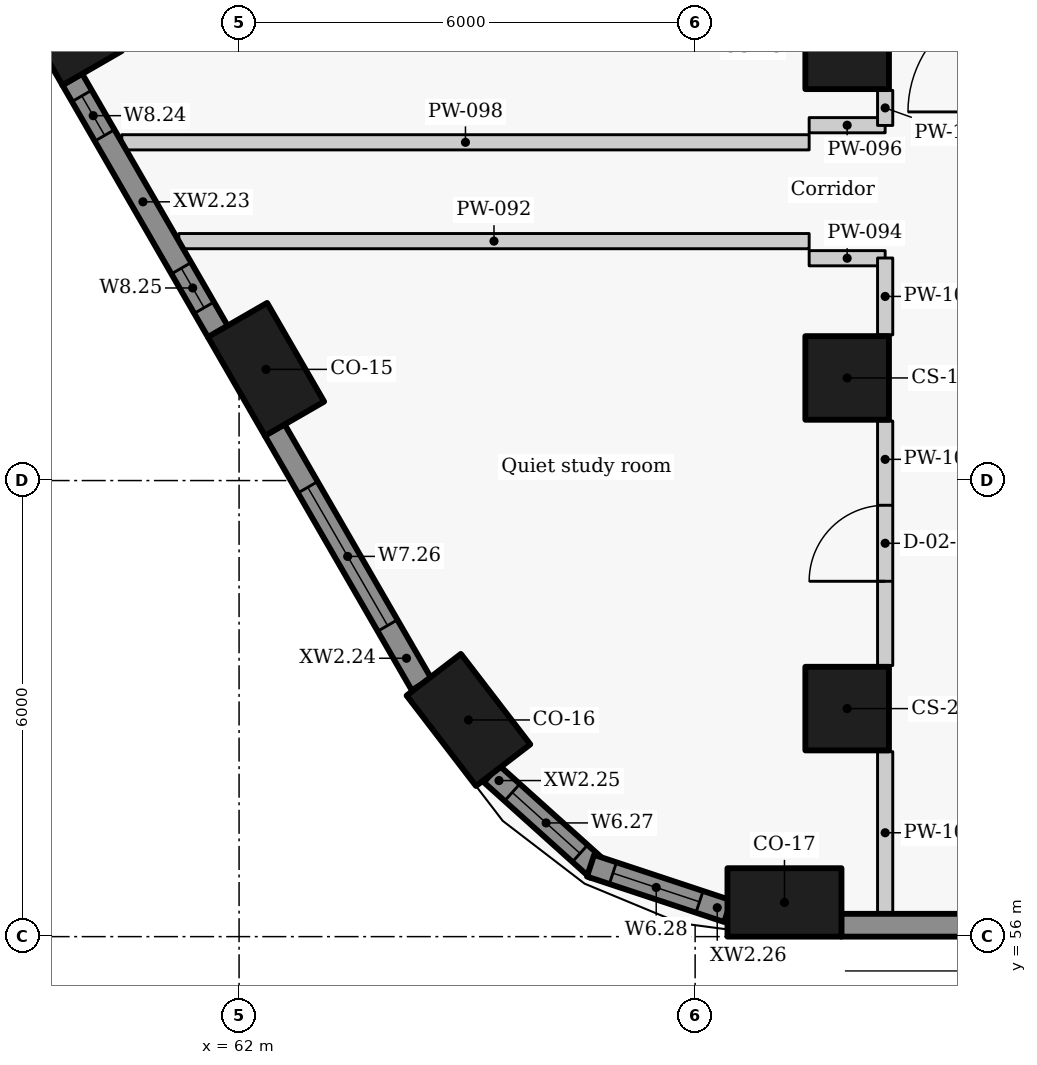
"""IFC4 building model, lengths in metres.
Left out: names, types, materials, properties, quantities, classifications, styles, units other than length and angle.
Written with IfcOpenShell. Run it as: python <this file> out.ifc"""

import sys

from ifc_helpers import new_model, si_unit, direction, frame, frame_2d, origin, origin_2d, place, context, subcontext, project, spatial, rectangle, extrude, element, fill, save


model = new_model("IFC4")
c1 = context("Model", 3, precision=1e-05, world=origin(), true_north=direction((0.0, 1.0)))
c2 = subcontext(c1, "Body", "Model", "MODEL_VIEW")
j1 = project(units=[si_unit("LENGTHUNIT", "METRE"), si_unit("PLANEANGLEUNIT", "RADIAN")], contexts=[c1])
p1 = place(None, origin())
s1 = spatial("IfcSite", under=j1, at=p1, CompositionType="ELEMENT")
p2 = place(p1, origin())
s2 = spatial("IfcBuilding", under=s1, at=p2, CompositionType="ELEMENT")
p3 = place(p2, frame((0.0, 0.0, 67.8)))
s3 = spatial("IfcBuildingStorey", under=s2, at=p3, CompositionType="ELEMENT", Elevation=67.8)
for number, where, z_axis, x_axis in (
    (1, (59.692, 68.075, 0.0), (0.0, 0.0, 1.0), (0.5, -0.866, 0.0)),
    (2, (62.354, 63.463, 0.0), (0.0, 0.0, 1.0), (0.5, -0.866, 0.0)),
    (3, (65.018, 58.851, 0.0), (0.0, 0.0, 1.0), (0.609, -0.793, 0.0)),
    (4, (69.175, 56.45, 0.0), (0.0, 0.0, 1.0), (1.0, 0.0, 0.0)),
):
    element("IfcColumn", number, at=place(p3, frame(where, z_axis=z_axis, x_axis=x_axis)), inside=s3, PredefinedType="COLUMN", context=c2, shape_type="SweptSolid", body=[
        extrude(rectangle(XDim=1.5, YDim=0.9, at=origin_2d()), origin(), (0.0, 0.0, 1.0), 3.3),
    ])
for number, where, z_axis, x_axis in (
    (5, (70.0, 67.7, 0.0), (0.0, 0.0, 1.0), (0.0, -1.0, 0.0)),
    (6, (70.0, 63.35, 0.0), (0.0, 0.0, 1.0), (0.0, -1.0, 0.0)),
    (7, (70.0, 59.0, 0.0), (0.0, 0.0, 1.0), (0.0, -1.0, 0.0)),
):
    element("IfcColumn", number, at=place(p3, frame(where, z_axis=z_axis, x_axis=x_axis)), inside=s3, PredefinedType="COLUMN", context=c2, shape_type="SweptSolid", body=[
        extrude(rectangle(XDim=1.1, YDim=1.1, at=origin_2d()), origin(), (0.0, 0.0, 1.0), 3.3),
    ])
p4 = place(p3, frame((59.805, 67.279, 0.0), z_axis=(0.0, 0.0, 1.0), x_axis=(0.500001735503, -0.866024401789, 0.0)))
e8 = element("IfcWall", 8, at=p4, inside=s3, PredefinedType="SOLIDWALL", context=c2, shape_type="SweptSolid", body=[
    extrude(rectangle(XDim=3.834, YDim=0.3, at=frame_2d((1.917, 0.0))), origin(), (0.0, 0.0, 1.0), 2.05),
])
p5 = place(p4, frame((0.253, 0.0, 0.9)))
e9 = element("IfcOpeningElement", 9, at=p5, cuts=e8, PredefinedType="OPENING", context=c2, shape_type="SweptSolid", body=[
    extrude(rectangle(XDim=0.6, YDim=1.1, at=frame_2d((0.3, 0.55))), frame((0.0, 0.16, 0.0), z_axis=(0.0, -1.0, 0.0), x_axis=(1.0, 0.0, 0.0)), (0.0, 0.0, 1.0), 0.32),
])
p6 = place(p4, frame((2.87, 0.0, 0.9)))
e10 = element("IfcOpeningElement", 10, at=p6, cuts=e8, PredefinedType="OPENING", context=c2, shape_type="SweptSolid", body=[
    extrude(rectangle(XDim=0.6, YDim=1.1, at=frame_2d((0.3, 0.55))), frame((0.0, 0.16, 0.0), z_axis=(0.0, -1.0, 0.0), x_axis=(1.0, 0.0, 0.0)), (0.0, 0.0, 1.0), 0.32),
])
p7 = place(p3, frame((62.468, 62.667, 0.0), z_axis=(0.0, 0.0, 1.0), x_axis=(0.499948341072, -0.866055227026, 0.0)))
e11 = element("IfcWall", 11, at=p7, inside=s3, PredefinedType="SOLIDWALL", context=c2, shape_type="SweptSolid", body=[
    extrude(rectangle(XDim=3.867, YDim=0.3, at=frame_2d((1.934, 0.0))), origin(), (0.0, 0.0, 1.0), 2.05),
])
p8 = place(p7, frame((0.872, 0.0, 0.9)))
e12 = element("IfcOpeningElement", 12, at=p8, cuts=e11, PredefinedType="OPENING", context=c2, shape_type="SweptSolid", body=[
    extrude(rectangle(XDim=2.1, YDim=1.1, at=frame_2d((1.05, 0.55))), frame((0.0, 0.16, 0.0), z_axis=(0.0, -1.0, 0.0), x_axis=(1.0, 0.0, 0.0)), (0.0, 0.0, 1.0), 0.32),
])
p9 = place(p3, frame((65.32, 58.143, 0.0), z_axis=(0.0, 0.0, 1.0), x_axis=(0.7435526378, -0.668677407141, 0.0)))
e13 = element("IfcWall", 13, at=p9, inside=s3, PredefinedType="SOLIDWALL", context=c2, shape_type="SweptSolid", body=[
    extrude(rectangle(XDim=1.878, YDim=0.3, at=frame_2d((0.939, 0.0))), origin(), (0.0, 0.0, 1.0), 2.05),
])
p10 = place(p9, frame((0.367, 0.0, 0.9)))
e14 = element("IfcOpeningElement", 14, at=p10, cuts=e13, PredefinedType="OPENING", context=c2, shape_type="SweptSolid", body=[
    extrude(rectangle(XDim=1.2, YDim=1.1, at=frame_2d((0.6, 0.55))), frame((0.0, 0.16, 0.0), z_axis=(0.0, -1.0, 0.0), x_axis=(1.0, 0.0, 0.0)), (0.0, 0.0, 1.0), 0.32),
])
p11 = place(p3, frame((66.624, 56.933, 0.0), z_axis=(0.0, 0.0, 1.0), x_axis=(0.949246659442, -0.314532636683, 0.0)))
e15 = element("IfcWall", 15, at=p11, inside=s3, PredefinedType="SOLIDWALL", context=c2, shape_type="SweptSolid", body=[
    extrude(rectangle(XDim=1.902, YDim=0.3, at=frame_2d((0.951, 0.0))), origin(), (0.0, 0.0, 1.0), 2.05),
])
p12 = place(p11, frame((0.31, 0.0, 0.9)))
e16 = element("IfcOpeningElement", 16, at=p12, cuts=e15, PredefinedType="OPENING", context=c2, shape_type="SweptSolid", body=[
    extrude(rectangle(XDim=1.2, YDim=1.1, at=frame_2d((0.6, 0.55))), frame((0.0, 0.16, 0.0), z_axis=(0.0, -1.0, 0.0), x_axis=(1.0, 0.0, 0.0)), (0.0, 0.0, 1.0), 0.32),
])
p13 = place(p3, frame((69.921, 56.15, 0.0), z_axis=(0.0, 0.0, 1.0), x_axis=(1.0, 0.0, 0.0)))
e17 = element("IfcWall", 17, at=p13, inside=s3, PredefinedType="SOLIDWALL", context=c2, shape_type="SweptSolid", body=[
    extrude(rectangle(XDim=19.84, YDim=0.3, at=frame_2d((9.92, 0.0))), origin(), (0.0, 0.0, 1.0), 2.05),
])
p14 = place(p3, frame((61.207, 65.15, 0.0), z_axis=(0.0, 0.0, 1.0), x_axis=(1.0, 0.0, 0.0)))
e18 = element("IfcWall", 18, at=p14, inside=s3, PredefinedType="PARTITIONING", context=c2, shape_type="SweptSolid", body=[
    extrude(rectangle(XDim=8.293, YDim=0.2, at=frame_2d((4.146, 0.0))), origin(), (0.0, 0.0, 1.0), 2.03),
])
for number, where, z_axis, x_axis in (
    (19, (69.5, 64.925, 0.0), (0.0, 0.0, 1.0), (1.0, 0.0, 0.0)),
    (20, (69.5, 66.675, 0.0), (0.0, 0.0, 1.0), (1.0, 0.0, 0.0)),
):
    element("IfcWall", number, at=place(p3, frame(where, z_axis=z_axis, x_axis=x_axis)), inside=s3, PredefinedType="PARTITIONING", context=c2, shape_type="SweptSolid", body=[
        extrude(rectangle(XDim=1.0, YDim=0.2, at=frame_2d((0.5, 0.0))), origin(), (0.0, 0.0, 1.0), 2.43),
    ])
p15 = place(p3, frame((60.457, 66.45, 0.0), z_axis=(0.0, 0.0, 1.0), x_axis=(1.0, 0.0, 0.0)))
e21 = element("IfcWall", 21, at=p15, inside=s3, PredefinedType="PARTITIONING", context=c2, shape_type="SweptSolid", body=[
    extrude(rectangle(XDim=9.043, YDim=0.2, at=frame_2d((4.521, 0.0))), origin(), (0.0, 0.0, 1.0), 2.03),
])
p16 = place(p3, frame((70.5, 56.3, 0.0), z_axis=(0.0, 0.0, 1.0), x_axis=(0.0, 1.0, 0.0)))
e22 = element("IfcWall", 22, at=p16, inside=s3, PredefinedType="PARTITIONING", context=c2, shape_type="SweptSolid", body=[
    extrude(rectangle(XDim=2.133, YDim=0.2, at=frame_2d((1.066, 0.0))), origin(), (0.0, 0.0, 1.0), 2.95),
])
p17 = place(p3, frame((70.5, 59.567, 0.0), z_axis=(0.0, 0.0, 1.0), x_axis=(0.0, 1.0, 0.0)))
e23 = element("IfcWall", 23, at=p17, inside=s3, PredefinedType="PARTITIONING", context=c2, shape_type="SweptSolid", body=[
    extrude(rectangle(XDim=3.216, YDim=0.2, at=frame_2d((1.608, 0.0))), origin(), (0.0, 0.0, 1.0), 2.95),
])
p18 = place(p17, frame((1.108, 0.0, 0.0)))
e24 = element("IfcOpeningElement", 24, at=p18, cuts=e23, PredefinedType="OPENING", context=c2, shape_type="SweptSolid", body=[
    extrude(rectangle(XDim=1.0, YDim=2.1, at=frame_2d((0.5, 1.05))), frame((0.0, 0.11, 0.0), z_axis=(0.0, -1.0, 0.0), x_axis=(1.0, 0.0, 0.0)), (0.0, 0.0, 1.0), 0.22),
])
p19 = place(p3, frame((70.5, 63.917, 0.0), z_axis=(0.0, 0.0, 1.0), x_axis=(0.0, 1.0, 0.0)))
e25 = element("IfcWall", 25, at=p19, inside=s3, PredefinedType="PARTITIONING", context=c2, shape_type="SweptSolid", body=[
    extrude(rectangle(XDim=1.011, YDim=0.2, at=frame_2d((0.505, 0.0))), origin(), (0.0, 0.0, 1.0), 2.95),
])
p20 = place(p3, frame((70.5, 66.672, 0.0), z_axis=(0.0, 0.0, 1.0), x_axis=(0.0, 1.0, 0.0)))
e26 = element("IfcWall", 26, at=p20, inside=s3, PredefinedType="PARTITIONING", context=c2, shape_type="SweptSolid", body=[
    extrude(rectangle(XDim=0.461, YDim=0.2, at=frame_2d((0.23, 0.0))), origin(), (0.0, 0.0, 1.0), 2.95),
])
p21 = place(p5, origin())
e27 = element("IfcWindow", 27, at=p21, inside=s3, PartitioningType="SINGLE_PANEL", PredefinedType="WINDOW", context=c2, shape_type="SweptSolid", body=[
    extrude(rectangle(XDim=0.6, YDim=1.1, at=frame_2d((0.3, 0.55))), frame((0.0, 0.03, 0.0), z_axis=(0.0, -1.0, 0.0), x_axis=(1.0, 0.0, 0.0)), (0.0, 0.0, 1.0), 0.06),
])
fill(e9, e27)
p22 = place(p6, origin())
e28 = element("IfcWindow", 28, at=p22, inside=s3, PartitioningType="SINGLE_PANEL", PredefinedType="WINDOW", context=c2, shape_type="SweptSolid", body=[
    extrude(rectangle(XDim=0.6, YDim=1.1, at=frame_2d((0.3, 0.55))), frame((0.0, 0.03, 0.0), z_axis=(0.0, -1.0, 0.0), x_axis=(1.0, 0.0, 0.0)), (0.0, 0.0, 1.0), 0.06),
])
fill(e10, e28)
p23 = place(p8, origin())
e29 = element("IfcWindow", 29, at=p23, inside=s3, PartitioningType="SINGLE_PANEL", PredefinedType="WINDOW", context=c2, shape_type="SweptSolid", body=[
    extrude(rectangle(XDim=2.1, YDim=1.1, at=frame_2d((1.05, 0.55))), frame((0.0, 0.03, 0.0), z_axis=(0.0, -1.0, 0.0), x_axis=(1.0, 0.0, 0.0)), (0.0, 0.0, 1.0), 0.06),
])
fill(e12, e29)
p24 = place(p10, origin())
e30 = element("IfcWindow", 30, at=p24, inside=s3, PartitioningType="SINGLE_PANEL", PredefinedType="WINDOW", context=c2, shape_type="SweptSolid", body=[
    extrude(rectangle(XDim=1.2, YDim=1.1, at=frame_2d((0.6, 0.55))), frame((0.0, 0.03, 0.0), z_axis=(0.0, -1.0, 0.0), x_axis=(1.0, 0.0, 0.0)), (0.0, 0.0, 1.0), 0.06),
])
fill(e14, e30)
p25 = place(p12, origin())
e31 = element("IfcWindow", 31, at=p25, inside=s3, PartitioningType="SINGLE_PANEL", PredefinedType="WINDOW", context=c2, shape_type="SweptSolid", body=[
    extrude(rectangle(XDim=1.2, YDim=1.1, at=frame_2d((0.6, 0.55))), frame((0.0, 0.03, 0.0), z_axis=(0.0, -1.0, 0.0), x_axis=(1.0, 0.0, 0.0)), (0.0, 0.0, 1.0), 0.06),
])
fill(e16, e31)
p26 = place(p18, origin())
e32 = element("IfcDoor", 32, at=p26, inside=s3, OperationType="SINGLE_SWING_LEFT", PredefinedType="DOOR", context=c2, shape_type="SweptSolid", body=[
    extrude(rectangle(XDim=1.0, YDim=2.1, at=frame_2d((0.5, 1.05))), frame((0.0, 0.025, 0.0), z_axis=(0.0, -1.0, 0.0), x_axis=(1.0, 0.0, 0.0)), (0.0, 0.0, 1.0), 0.05),
])
fill(e24, e32)
save(model, sys.argv[1])
